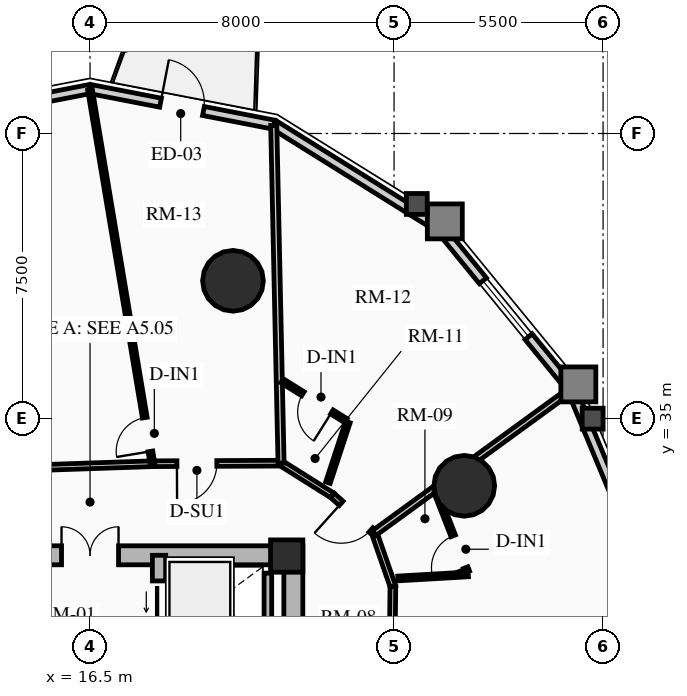
"""IFC4 building model, lengths in metres.
Left out: names, types, materials, properties, quantities, classifications, styles, units other than length and angle.
Written with IfcOpenShell. Run it as: python <this file> out.ifc"""

import sys

from ifc_helpers import new_model, si_unit, direction, frame, frame_2d, origin, origin_2d, place, context, subcontext, project, spatial, rectangle, circle, extrude, source, transform, mapped, element, fill, save


model = new_model("IFC4")
c1 = context("Model", 3, precision=1e-05, world=origin(), true_north=direction((0.0, 1.0)))
c2 = subcontext(c1, "Body", "Model", "MODEL_VIEW")
j1 = project(units=[si_unit("LENGTHUNIT", "METRE"), si_unit("PLANEANGLEUNIT", "RADIAN")], contexts=[c1])
p1 = place(None, origin())
s1 = spatial("IfcSite", under=j1, at=p1, CompositionType="ELEMENT")
p2 = place(p1, origin())
s2 = spatial("IfcBuilding", under=s1, at=p2, CompositionType="ELEMENT")
p3 = place(p2, frame((0.0, 0.0, 48.19)))
s3 = spatial("IfcBuildingStorey", under=s2, at=p3, CompositionType="ELEMENT", Elevation=48.19)
p4 = place(p3, frame((21.85, 17.35, 0.0), z_axis=(0.0, 0.0, 1.0), x_axis=(0.0, 1.0, 0.0)))
e1 = element("IfcWall", 1, at=p4, inside=s3, PredefinedType="SHEAR", context=c2, shape_type="SweptSolid", body=[
    extrude(rectangle(XDim=14.3, YDim=0.5, at=frame_2d((7.15, 0.0))), origin(), (0.0, 0.0, 1.0), 2.91),
])
p5 = place(p3, frame((11.15, 31.4, 0.0), z_axis=(0.0, 0.0, 1.0), x_axis=(1.0, 0.0, 0.0)))
e2 = element("IfcWall", 2, at=p5, inside=s3, PredefinedType="SHEAR", context=c2, shape_type="SweptSolid", body=[
    extrude(rectangle(XDim=10.7, YDim=0.5, at=frame_2d((5.35, 0.0))), origin(), (0.0, 0.0, 1.0), 2.91),
])
m1 = source(origin(), c2, "Body", "SweptSolid", [
    extrude(rectangle(XDim=1.5, YDim=2.02, at=frame_2d((0.75, 1.01))), frame((0.0, 0.26, 0.0), z_axis=(0.0, -1.0, 0.0), x_axis=(1.0, 0.0, 0.0)), (0.0, 0.0, 1.0), 0.52),
])
p6 = place(p5, frame((4.6, 0.0, 0.0)))
e3 = element("IfcOpeningElement", 3, at=p6, cuts=e2, PredefinedType="OPENING", context=c2, shape_type="MappedRepresentation", body=[
    mapped(m1, transform((0.0, 0.0, 0.0), x_axis=(1.0, 0.0, 0.0), y_axis=(0.0, 1.0, 0.0), z_axis=(0.0, 0.0, 1.0), scale=1.0)),
])
p7 = place(p3, frame((18.315, 17.6, 0.0), z_axis=(0.0, 0.0, 1.0), x_axis=(0.0, 1.0, 0.0)))
e4 = element("IfcWall", 4, at=p7, inside=s3, PredefinedType="SHEAR", context=c2, shape_type="SweptSolid", body=[
    extrude(rectangle(XDim=13.8, YDim=0.35, at=frame_2d((6.9, 0.0))), origin(), (0.0, 0.0, 1.0), 2.91),
])
m2 = source(origin(), c2, "Body", "SweptSolid", [
    extrude(rectangle(XDim=1.1, YDim=2.015, at=frame_2d((0.55, 1.007))), frame((0.0, 0.185, 0.0), z_axis=(0.0, -1.0, 0.0), x_axis=(1.0, 0.0, 0.0)), (0.0, 0.0, 1.0), 0.37),
])
p8 = place(p7, frame((10.025, 0.0, 0.0)))
e5 = element("IfcOpeningElement", 5, at=p8, cuts=e4, PredefinedType="OPENING", context=c2, shape_type="MappedRepresentation", body=[
    mapped(m2, transform((0.0, 0.0, 0.0), x_axis=(1.0, 0.0, 0.0), y_axis=(0.0, 1.0, 0.0), z_axis=(0.0, 0.0, 1.0), scale=1.0)),
])
p9 = place(p7, frame((12.025, 0.0, 0.0)))
e6 = element("IfcOpeningElement", 6, at=p9, cuts=e4, PredefinedType="OPENING", context=c2, shape_type="MappedRepresentation", body=[
    mapped(m2, transform((0.0, 0.0, 0.0), x_axis=(1.0, 0.0, 0.0), y_axis=(0.0, 1.0, 0.0), z_axis=(0.0, 0.0, 1.0), scale=1.0)),
])
m3 = source(origin(), c2, "Body", "SweptSolid", [
    extrude(rectangle(XDim=1.15, YDim=2.02, at=frame_2d((0.575, 1.01))), frame((0.0, 0.185, 0.0), z_axis=(0.0, -1.0, 0.0), x_axis=(1.0, 0.0, 0.0)), (0.0, 0.0, 1.0), 0.37),
])
p10 = place(p7, frame((5.33, 0.0, 0.0)))
e7 = element("IfcOpeningElement", 7, at=p10, cuts=e4, PredefinedType="OPENING", context=c2, shape_type="MappedRepresentation", body=[
    mapped(m3, transform((0.0, 0.0, 0.0), x_axis=(1.0, 0.0, 0.0), y_axis=(0.0, 1.0, 0.0), z_axis=(0.0, 0.0, 1.0), scale=1.0)),
])
p11 = place(p3, frame((21.675, 31.38, 0.0), z_axis=(0.0, 0.0, 1.0), x_axis=(1.0, 0.0, 0.0)))
e8 = element("IfcColumn", 8, at=p11, inside=s3, PredefinedType="COLUMN", context=c2, shape_type="SweptSolid", body=[
    extrude(rectangle(XDim=0.85, YDim=0.85, at=origin_2d()), origin(), (0.0, 0.0, 1.0), 2.91),
])
for number, where, z_axis, x_axis in (
    (9, (26.347, 33.229, 0.0), (0.0, 0.0, 1.0), (1.0, 0.0, 0.0)),
    (10, (20.261, 38.623, 0.0), (0.0, 0.0, 1.0), (1.0, 0.0, 0.0)),
):
    element("IfcColumn", number, at=place(p3, frame(where, z_axis=z_axis, x_axis=x_axis)), inside=s3, PredefinedType="USERDEFINED", context=c2, shape_type="SweptSolid", body=[
        extrude(circle(Radius=0.8, at=origin_2d()), origin(), (0.0, 0.0, 1.0), 2.91),
    ])
p12 = place(p3, frame((29.172, 35.768, 0.0), z_axis=(0.0, 0.0, 1.0), x_axis=(0.384348836956, -0.923187939442, 0.0)))
e11 = element("IfcWall", 11, at=p12, inside=s3, PredefinedType="SOLIDWALL", context=c2, shape_type="SweptSolid", body=[
    extrude(rectangle(XDim=5.789, YDim=0.24, at=frame_2d((2.894, 0.0))), origin(), (0.0, 0.0, 1.0), 2.073),
])
p13 = place(p3, frame((25.707, 40.009, 0.0), z_axis=(0.0, 0.0, 1.0), x_axis=(0.632713287022, -0.77438614168, 0.0)))
e12 = element("IfcWall", 12, at=p13, inside=s3, PredefinedType="SOLIDWALL", context=c2, shape_type="SweptSolid", body=[
    extrude(rectangle(XDim=5.477, YDim=0.24, at=frame_2d((2.738, 0.0))), origin(), (0.0, 0.0, 1.0), 2.073),
])
m4 = source(origin(), c2, "Body", "SweptSolid", [
    extrude(rectangle(XDim=1.9, YDim=1.35, at=frame_2d((0.95, 0.675))), frame((0.0, 0.13, 0.0), z_axis=(0.0, -1.0, 0.0), x_axis=(1.0, 0.0, 0.0)), (0.0, 0.0, 1.0), 0.26),
])
p14 = place(p13, frame((1.788, 0.0, 0.65)))
e13 = element("IfcOpeningElement", 13, at=p14, cuts=e12, PredefinedType="OPENING", context=c2, shape_type="MappedRepresentation", body=[
    mapped(m4, transform((0.0, 0.0, 0.0), x_axis=(1.0, 0.0, 0.0), y_axis=(0.0, 1.0, 0.0), z_axis=(0.0, 0.0, 1.0), scale=1.0)),
])
p15 = place(p3, frame((21.34, 42.732, 0.0), z_axis=(0.0, 0.0, 1.0), x_axis=(0.848533613342, -0.529141481107, 0.0)))
e14 = element("IfcWall", 14, at=p15, inside=s3, PredefinedType="SOLIDWALL", context=c2, shape_type="SweptSolid", body=[
    extrude(rectangle(XDim=5.146, YDim=0.24, at=frame_2d((2.573, 0.0))), origin(), (0.0, 0.0, 1.0), 2.073),
])
p16 = place(p3, frame((16.5, 43.67, 0.0), z_axis=(0.0, 0.0, 1.0), x_axis=(0.981725274071, -0.190303668512, 0.0)))
e15 = element("IfcWall", 15, at=p16, inside=s3, PredefinedType="SOLIDWALL", context=c2, shape_type="SweptSolid", body=[
    extrude(rectangle(XDim=4.93, YDim=0.24, at=frame_2d((2.465, 0.0))), origin(), (0.0, 0.0, 1.0), 2.073),
])
m5 = source(origin(), c2, "Body", "SweptSolid", [
    extrude(rectangle(XDim=1.15, YDim=2.005, at=frame_2d((0.575, 1.002))), frame((0.0, 0.13, 0.0), z_axis=(0.0, -1.0, 0.0), x_axis=(1.0, 0.0, 0.0)), (0.0, 0.0, 1.0), 0.26),
])
p17 = place(p16, frame((1.89, 0.0, 0.0)))
e16 = element("IfcOpeningElement", 16, at=p17, cuts=e15, PredefinedType="OPENING", context=c2, shape_type="MappedRepresentation", body=[
    mapped(m5, transform((0.0, 0.0, 0.0), x_axis=(1.0, 0.0, 0.0), y_axis=(0.0, 1.0, 0.0), z_axis=(0.0, 0.0, 1.0), scale=1.0)),
])
p18 = place(p3, frame((11.66, 42.732, 0.0), z_axis=(0.0, 0.0, 1.0), x_axis=(0.981725274071, 0.190303668512, 0.0)))
e17 = element("IfcWall", 17, at=p18, inside=s3, PredefinedType="SOLIDWALL", context=c2, shape_type="SweptSolid", body=[
    extrude(rectangle(XDim=4.93, YDim=0.24, at=frame_2d((2.465, 0.0))), origin(), (0.0, 0.0, 1.0), 2.073),
])
p19 = place(p18, frame((1.515, 0.0, 0.65)))
e18 = element("IfcOpeningElement", 18, at=p19, cuts=e17, PredefinedType="OPENING", context=c2, shape_type="MappedRepresentation", body=[
    mapped(m4, transform((0.0, 0.0, 0.0), x_axis=(1.0, 0.0, 0.0), y_axis=(0.0, 1.0, 0.0), z_axis=(0.0, 0.0, 1.0), scale=1.0)),
])
p20 = place(p3, frame((21.18, 29.295, 0.0), z_axis=(0.0, 0.0, 1.0), x_axis=(0.0, 1.0, 0.0)))
e19 = element("IfcWall", 19, at=p20, inside=s3, PredefinedType="SHEAR", context=c2, shape_type="SweptSolid", body=[
    extrude(rectangle(XDim=1.635, YDim=0.2, at=frame_2d((0.817, 0.0))), origin(), (0.0, 0.0, 1.0), 2.91),
])
p21 = place(p3, frame((24.4, 24.5, 0.0), z_axis=(0.0, 0.0, 1.0), x_axis=(0.011359710161, 0.999935476411, 0.0)))
e20 = element("IfcWall", 20, at=p21, inside=s3, PredefinedType="PARTITIONING", context=c2, shape_type="SweptSolid", body=[
    extrude(rectangle(XDim=6.082, YDim=0.15, at=frame_2d((3.041, 0.0))), origin(), (0.0, 0.0, 1.0), 2.159),
])
m6 = source(origin(), c2, "Body", "SweptSolid", [
    extrude(rectangle(XDim=1.05, YDim=2.015, at=frame_2d((0.525, 1.007))), frame((0.0, 0.085, 0.0), z_axis=(0.0, -1.0, 0.0), x_axis=(1.0, 0.0, 0.0)), (0.0, 0.0, 1.0), 0.17),
])
p22 = place(p21, frame((2.516, 0.0, 0.0)))
e21 = element("IfcOpeningElement", 21, at=p22, cuts=e20, PredefinedType="OPENING", context=c2, shape_type="MappedRepresentation", body=[
    mapped(m6, transform((0.0, 0.0, 0.0), x_axis=(1.0, 0.0, 0.0), y_axis=(0.0, 1.0, 0.0), z_axis=(0.0, 0.0, 1.0), scale=1.0)),
])
p23 = place(p3, frame((24.469, 30.582, 0.0), z_axis=(0.0, 0.0, 1.0), x_axis=(-0.328902536986, 0.944363871166, 0.0)))
e22 = element("IfcWall", 22, at=p23, inside=s3, PredefinedType="PARTITIONING", context=c2, shape_type="SweptSolid", body=[
    extrude(rectangle(XDim=1.488, YDim=0.15, at=frame_2d((0.744, 0.0))), origin(), (0.0, 0.0, 1.0), 2.205),
])
p24 = place(p3, frame((23.98, 31.987, 0.0), z_axis=(0.0, 0.0, 1.0), x_axis=(-0.744317922268, 0.667825449193, 0.0)))
e23 = element("IfcWall", 23, at=p24, inside=s3, PredefinedType="PARTITIONING", context=c2, shape_type="SweptSolid", body=[
    extrude(rectangle(XDim=1.481, YDim=0.15, at=frame_2d((0.74, 0.0))), origin(), (0.0, 0.0, 1.0), 2.159),
])
p25 = place(p24, frame((0.12, 0.0, 0.0)))
e24 = element("IfcOpeningElement", 24, at=p25, cuts=e23, PredefinedType="OPENING", context=c2, shape_type="MappedRepresentation", body=[
    mapped(m6, transform((0.0, 0.0, 0.0), x_axis=(1.0, 0.0, 0.0), y_axis=(0.0, 1.0, 0.0), z_axis=(0.0, 0.0, 1.0), scale=1.0)),
])
p26 = place(p3, frame((22.877, 32.976, 0.0), z_axis=(0.0, 0.0, 1.0), x_axis=(-0.846723232687, 0.532033614754, 0.0)))
e25 = element("IfcWall", 25, at=p26, inside=s3, PredefinedType="PARTITIONING", context=c2, shape_type="SweptSolid", body=[
    extrude(rectangle(XDim=1.595, YDim=0.15, at=frame_2d((0.797, 0.0))), origin(), (0.0, 0.0, 1.0), 2.205),
])
p27 = place(p3, frame((21.527, 33.824, 0.0), z_axis=(0.0, 0.0, 1.0), x_axis=(-0.999990631344, -0.00432865146, 0.0)))
e26 = element("IfcWall", 26, at=p27, inside=s3, PredefinedType="PARTITIONING", context=c2, shape_type="SweptSolid", body=[
    extrude(rectangle(XDim=3.384, YDim=0.15, at=frame_2d((1.692, 0.0))), origin(), (0.0, 0.0, 1.0), 2.159),
])
p28 = place(p27, frame((1.69, 0.0, 0.0)))
e27 = element("IfcOpeningElement", 27, at=p28, cuts=e26, PredefinedType="OPENING", context=c2, shape_type="MappedRepresentation", body=[
    mapped(m6, transform((0.0, 0.0, 0.0), x_axis=(1.0, 0.0, 0.0), y_axis=(0.0, 1.0, 0.0), z_axis=(0.0, 0.0, 1.0), scale=1.0)),
])
p29 = place(p3, frame((18.143, 33.81, 0.0), z_axis=(0.0, 0.0, 1.0), x_axis=(-0.999423023908, -0.033964971394, 0.0)))
e28 = element("IfcWall", 28, at=p29, inside=s3, PredefinedType="PARTITIONING", context=c2, shape_type="SweptSolid", body=[
    extrude(rectangle(XDim=6.527, YDim=0.15, at=frame_2d((3.263, 0.0))), origin(), (0.0, 0.0, 1.0), 2.159),
])
p30 = place(p3, frame((23.98, 31.987, 0.0), z_axis=(0.0, 0.0, 1.0), x_axis=(0.80834018144, 0.588715679313, 0.0)))
e29 = element("IfcWall", 29, at=p30, inside=s3, PredefinedType="PARTITIONING", context=c2, shape_type="SweptSolid", body=[
    extrude(rectangle(XDim=6.403, YDim=0.16, at=frame_2d((3.202, 0.0))), origin(), (0.0, 0.0, 1.0), 2.073),
])
p31 = place(p3, frame((21.527, 33.824, 0.0), z_axis=(0.0, 0.0, 1.0), x_axis=(-0.021694017061, 0.999764657119, 0.0)))
e30 = element("IfcWall", 30, at=p31, inside=s3, PredefinedType="PARTITIONING", context=c2, shape_type="SweptSolid", body=[
    extrude(rectangle(XDim=8.891, YDim=0.16, at=frame_2d((4.445, 0.0))), origin(), (0.0, 0.0, 1.0), 2.073),
])
p32 = place(p3, frame((24.601, 30.79, 0.0), z_axis=(0.0, 0.0, 1.0), x_axis=(0.998323904123, 0.057873849514, 0.0)))
e31 = element("IfcWall", 31, at=p32, inside=s3, PredefinedType="PARTITIONING", context=c2, shape_type="SweptSolid", body=[
    extrude(rectangle(XDim=1.856, YDim=0.125, at=frame_2d((0.928, 0.0))), origin(), (0.0, 0.0, 1.0), 2.205),
])
p33 = place(p3, frame((26.428, 30.963, 0.0), z_axis=(0.0, 0.0, 1.0), x_axis=(-0.364149471566, 0.931340519014, 0.0)))
e32 = element("IfcWall", 32, at=p33, inside=s3, PredefinedType="PARTITIONING", context=c2, shape_type="SweptSolid", body=[
    extrude(rectangle(XDim=2.247, YDim=0.125, at=frame_2d((1.124, 0.0))), origin(), (0.0, 0.0, 1.0), 2.159),
])
m7 = source(origin(), c2, "Body", "SweptSolid", [
    extrude(rectangle(XDim=0.9, YDim=2.005, at=frame_2d((0.45, 1.002))), frame((0.0, 0.073, 0.0), z_axis=(0.0, -1.0, 0.0), x_axis=(1.0, 0.0, 0.0)), (0.0, 0.0, 1.0), 0.145),
])
p34 = place(p33, frame((0.12, 0.0, 0.0)))
e33 = element("IfcOpeningElement", 33, at=p34, cuts=e32, PredefinedType="OPENING", context=c2, shape_type="MappedRepresentation", body=[
    mapped(m7, transform((0.0, 0.0, 0.0), x_axis=(1.0, 0.0, 0.0), y_axis=(0.0, 1.0, 0.0), z_axis=(0.0, 0.0, 1.0), scale=1.0)),
])
p35 = place(p3, frame((22.76, 33.313, 0.0), z_axis=(0.0, 0.0, 1.0), x_axis=(0.312649886595, 0.949868437423, 0.0)))
e34 = element("IfcWall", 34, at=p35, inside=s3, PredefinedType="PARTITIONING", context=c2, shape_type="SweptSolid", body=[
    extrude(rectangle(XDim=1.68, YDim=0.125, at=frame_2d((0.84, 0.0))), origin(), (0.0, 0.0, 1.0), 2.205),
])
p36 = place(p3, frame((23.233, 34.941, 0.0), z_axis=(0.0, 0.0, 1.0), x_axis=(-0.84760373009, 0.53062973601, 0.0)))
e35 = element("IfcWall", 35, at=p36, inside=s3, PredefinedType="PARTITIONING", context=c2, shape_type="SweptSolid", body=[
    extrude(rectangle(XDim=1.983, YDim=0.125, at=frame_2d((0.991, 0.0))), origin(), (0.0, 0.0, 1.0), 2.635),
])
p37 = place(p36, frame((0.436, 0.0, 0.0)))
e36 = element("IfcOpeningElement", 36, at=p37, cuts=e35, PredefinedType="OPENING", context=c2, shape_type="MappedRepresentation", body=[
    mapped(m7, transform((0.0, 0.0, 0.0), x_axis=(1.0, 0.0, 0.0), y_axis=(0.0, 1.0, 0.0), z_axis=(0.0, 0.0, 1.0), scale=1.0)),
])
p38 = place(p3, frame((18.143, 33.81, 0.0), z_axis=(0.0, 0.0, 1.0), x_axis=(-0.164668829219, 0.986348912243, 0.0)))
e37 = element("IfcWall", 37, at=p38, inside=s3, PredefinedType="PARTITIONING", context=c2, shape_type="SweptSolid", body=[
    extrude(rectangle(XDim=9.977, YDim=0.125, at=frame_2d((4.988, 0.0))), origin(), (0.0, 0.0, 1.0), 2.073),
])
p39 = place(p38, frame((0.33, 0.0, 0.0)))
e38 = element("IfcOpeningElement", 38, at=p39, cuts=e37, PredefinedType="OPENING", context=c2, shape_type="MappedRepresentation", body=[
    mapped(m7, transform((0.0, 0.0, 0.0), x_axis=(1.0, 0.0, 0.0), y_axis=(0.0, 1.0, 0.0), z_axis=(0.0, 0.0, 1.0), scale=1.0)),
])
m8 = source(origin(), c2, "Body", "SweptSolid", [
    extrude(rectangle(XDim=1.9, YDim=1.35, at=frame_2d((0.95, 0.675))), frame((0.0, 0.03, 0.0), z_axis=(0.0, -1.0, 0.0), x_axis=(1.0, 0.0, 0.0)), (0.0, 0.0, 1.0), 0.06),
])
p40 = place(p14, origin())
e39 = element("IfcWindow", 39, at=p40, inside=s3, PartitioningType="DOUBLE_PANEL_VERTICAL", PredefinedType="WINDOW", context=c2, shape_type="MappedRepresentation", body=[
    mapped(m8, transform((0.0, 0.0, 0.0), x_axis=(1.0, 0.0, 0.0), y_axis=(0.0, 1.0, 0.0), z_axis=(0.0, 0.0, 1.0), scale=1.0)),
])
fill(e13, e39)
m9 = source(origin(), c2, "Body", "SweptSolid", [
    extrude(rectangle(XDim=1.15, YDim=2.005, at=frame_2d((0.575, 1.002))), frame((0.0, 0.025, 0.0), z_axis=(0.0, -1.0, 0.0), x_axis=(1.0, 0.0, 0.0)), (0.0, 0.0, 1.0), 0.05),
])
p41 = place(p17, origin())
e40 = element("IfcDoor", 40, at=p41, inside=s3, OperationType="SINGLE_SWING_LEFT", PredefinedType="DOOR", context=c2, shape_type="MappedRepresentation", body=[
    mapped(m9, transform((0.0, 0.0, 0.0), x_axis=(1.0, 0.0, 0.0), y_axis=(0.0, 1.0, 0.0), z_axis=(0.0, 0.0, 1.0), scale=1.0)),
])
fill(e16, e40)
m10 = source(origin(), c2, "Body", "SweptSolid", [
    extrude(rectangle(XDim=1.1, YDim=2.015, at=frame_2d((0.55, 1.007))), frame((0.0, 0.025, 0.0), z_axis=(0.0, -1.0, 0.0), x_axis=(1.0, 0.0, 0.0)), (0.0, 0.0, 1.0), 0.05),
])
p42 = place(p9, origin())
e41 = element("IfcDoor", 41, at=p42, inside=s3, OperationType="SLIDING_TO_LEFT", PredefinedType="DOOR", context=c2, shape_type="MappedRepresentation", body=[
    mapped(m10, transform((0.0, 0.0, 0.0), x_axis=(1.0, 0.0, 0.0), y_axis=(0.0, 1.0, 0.0), z_axis=(0.0, 0.0, 1.0), scale=1.0)),
])
fill(e6, e41)
m11 = source(origin(), c2, "Body", "SweptSolid", [
    extrude(rectangle(XDim=1.5, YDim=2.02, at=frame_2d((0.75, 1.01))), frame((0.0, 0.025, 0.0), z_axis=(0.0, -1.0, 0.0), x_axis=(1.0, 0.0, 0.0)), (0.0, 0.0, 1.0), 0.05),
])
p43 = place(p6, origin())
e42 = element("IfcDoor", 42, at=p43, inside=s3, OperationType="DOUBLE_DOOR_SINGLE_SWING", PredefinedType="DOOR", context=c2, shape_type="MappedRepresentation", body=[
    mapped(m11, transform((0.0, 0.0, 0.0), x_axis=(1.0, 0.0, 0.0), y_axis=(0.0, 1.0, 0.0), z_axis=(0.0, 0.0, 1.0), scale=1.0)),
])
fill(e3, e42)
m12 = source(origin(), c2, "Body", "SweptSolid", [
    extrude(rectangle(XDim=0.9, YDim=2.005, at=frame_2d((0.45, 1.002))), frame((0.0, 0.025, 0.0), z_axis=(0.0, -1.0, 0.0), x_axis=(1.0, 0.0, 0.0)), (0.0, 0.0, 1.0), 0.05),
])
p44 = place(p34, origin())
e43 = element("IfcDoor", 43, at=p44, inside=s3, OperationType="SINGLE_SWING_LEFT", PredefinedType="DOOR", context=c2, shape_type="MappedRepresentation", body=[
    mapped(m12, transform((0.0, 0.0, 0.0), x_axis=(1.0, 0.0, 0.0), y_axis=(0.0, 1.0, 0.0), z_axis=(0.0, 0.0, 1.0), scale=1.0)),
])
fill(e33, e43)
m13 = source(origin(), c2, "Body", "SweptSolid", [
    extrude(rectangle(XDim=1.05, YDim=2.015, at=frame_2d((0.525, 1.007))), frame((0.0, 0.025, 0.0), z_axis=(0.0, -1.0, 0.0), x_axis=(1.0, 0.0, 0.0)), (0.0, 0.0, 1.0), 0.05),
])
p45 = place(p25, origin())
e44 = element("IfcDoor", 44, at=p45, inside=s3, OperationType="SINGLE_SWING_RIGHT", PredefinedType="DOOR", context=c2, shape_type="MappedRepresentation", body=[
    mapped(m13, transform((0.0, 0.0, 0.0), x_axis=(1.0, 0.0, 0.0), y_axis=(0.0, 1.0, 0.0), z_axis=(0.0, 0.0, 1.0), scale=1.0)),
])
fill(e24, e44)
p46 = place(p37, origin())
e45 = element("IfcDoor", 45, at=p46, inside=s3, OperationType="SINGLE_SWING_LEFT", PredefinedType="DOOR", context=c2, shape_type="MappedRepresentation", body=[
    mapped(m12, transform((0.0, 0.0, 0.0), x_axis=(1.0, 0.0, 0.0), y_axis=(0.0, 1.0, 0.0), z_axis=(0.0, 0.0, 1.0), scale=1.0)),
])
fill(e36, e45)
p47 = place(p28, origin())
e46 = element("IfcDoor", 46, at=p47, inside=s3, OperationType="SINGLE_SWING_RIGHT", PredefinedType="DOOR", context=c2, shape_type="MappedRepresentation", body=[
    mapped(m13, transform((0.0, 0.0, 0.0), x_axis=(1.0, 0.0, 0.0), y_axis=(0.0, 1.0, 0.0), z_axis=(0.0, 0.0, 1.0), scale=1.0)),
])
fill(e27, e46)
p48 = place(p39, origin())
e47 = element("IfcDoor", 47, at=p48, inside=s3, OperationType="SINGLE_SWING_LEFT", PredefinedType="DOOR", context=c2, shape_type="MappedRepresentation", body=[
    mapped(m12, transform((0.0, 0.0, 0.0), x_axis=(1.0, 0.0, 0.0), y_axis=(0.0, 1.0, 0.0), z_axis=(0.0, 0.0, 1.0), scale=1.0)),
])
fill(e38, e47)
save(model, sys.argv[1])
